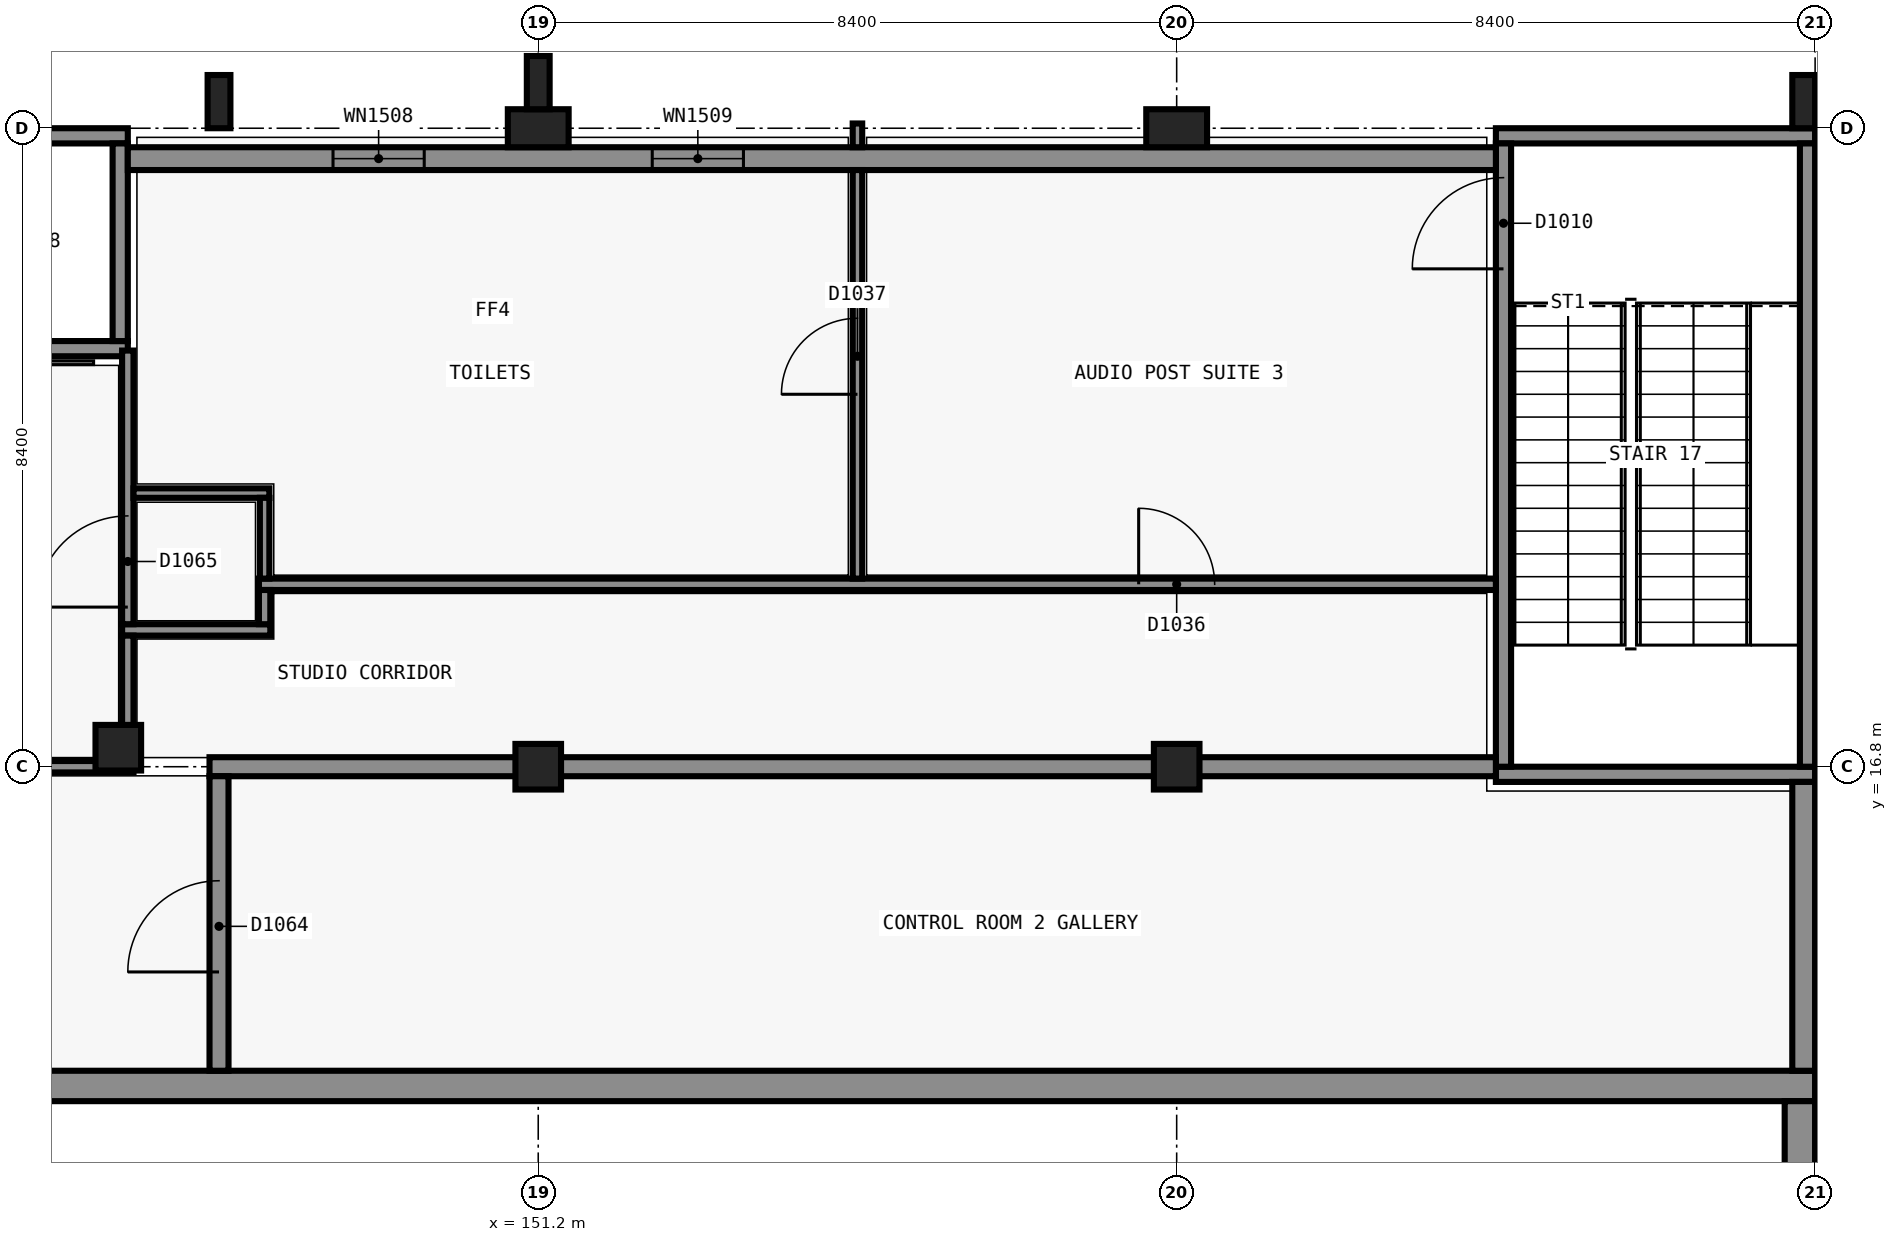
"""IFC4 building model, lengths in metres.
Left out: names, types, materials, properties, quantities, classifications, styles, units other than length and angle.
Written with IfcOpenShell. Run it as: python <this file> out.ifc"""

import sys

from ifc_helpers import new_model, si_unit, direction, frame, frame_2d, origin, origin_2d, place, context, subcontext, project, spatial, rectangle, extrude, element, fill, save


model = new_model("IFC4")
c1 = context("Model", 3, precision=1e-05, world=origin(), true_north=direction((0.0, 1.0)))
c2 = subcontext(c1, "Body", "Model", "MODEL_VIEW")
j1 = project(units=[si_unit("LENGTHUNIT", "METRE"), si_unit("PLANEANGLEUNIT", "RADIAN")], contexts=[c1])
p1 = place(None, origin())
s1 = spatial("IfcSite", under=j1, at=p1, CompositionType="ELEMENT")
p2 = place(p1, origin())
s2 = spatial("IfcBuilding", under=s1, at=p2, CompositionType="ELEMENT")
p3 = place(p2, frame((0.0, 0.0, 5.4)))
s3 = spatial("IfcBuildingStorey", under=s2, at=p3, CompositionType="ELEMENT", Elevation=5.4)
for number, where, z_axis, x_axis in (
    (1, (168.0, 16.7, 0.0), (0.0, 0.0, 1.0), (-1.0, 0.0, 0.0)),
    (2, (163.8, 25.1, 0.0), (0.0, 0.0, 1.0), (1.0, 0.0, 0.0)),
):
    element("IfcWall", number, at=place(p3, frame(where, z_axis=z_axis, x_axis=x_axis)), inside=s3, PredefinedType="SHEAR", context=c2, shape_type="SweptSolid", body=[
        extrude(rectangle(XDim=4.199, YDim=0.2, at=frame_2d((2.1, 0.0))), origin(), (0.0, 0.0, 1.0), 4.8),
    ])
p4 = place(p3, frame((163.9, 16.8, 0.0), z_axis=(0.0, 0.0, 1.0), x_axis=(0.0, 1.0, 0.0)))
e3 = element("IfcWall", 3, at=p4, inside=s3, PredefinedType="SHEAR", context=c2, shape_type="SweptSolid", body=[
    extrude(rectangle(XDim=8.2, YDim=0.2, at=frame_2d((4.1, 0.0))), origin(), (0.0, 0.0, 1.0), 4.8),
])
p5 = place(p4, frame((6.55, 0.0, 0.0)))
e4 = element("IfcOpeningElement", 4, at=p5, cuts=e3, PredefinedType="OPENING", context=c2, shape_type="SweptSolid", body=[
    extrude(rectangle(XDim=1.2, YDim=2.1, at=frame_2d((0.6, 1.05))), frame((0.0, 0.11, 0.0), z_axis=(0.0, -1.0, 0.0), x_axis=(1.0, 0.0, 0.0)), (0.0, 0.0, 1.0), 0.22),
])
p6 = place(p3, frame((167.9, 25.0, 0.0), z_axis=(0.0, 0.0, 1.0), x_axis=(0.0, -1.0, 0.0)))
e5 = element("IfcWall", 5, at=p6, inside=s3, PredefinedType="SHEAR", context=c2, shape_type="SweptSolid", body=[
    extrude(rectangle(XDim=8.2, YDim=0.2, at=frame_2d((4.1, 0.0))), origin(), (0.0, 0.0, 1.0), 4.8),
])
p7 = place(p3, frame((145.8, 22.3, 0.0), z_axis=(0.0, 0.0, 1.0), x_axis=(-1.0, 0.0, 0.0)))
e6 = element("IfcWall", 6, at=p7, inside=s3, PredefinedType="SHEAR", context=c2, shape_type="SweptSolid", body=[
    extrude(rectangle(XDim=4.2, YDim=0.2, at=frame_2d((2.1, 0.0))), origin(), (0.0, 0.0, 1.0), 4.8),
])
p8 = place(p7, frame((1.55, 0.0, 0.0)))
e7 = element("IfcOpeningElement", 7, at=p8, cuts=e6, PredefinedType="OPENING", context=c2, shape_type="SweptSolid", body=[
    extrude(rectangle(XDim=1.1, YDim=2.1, at=frame_2d((0.55, 1.05))), frame((0.0, 0.11, 0.0), z_axis=(0.0, -1.0, 0.0), x_axis=(1.0, 0.0, 0.0)), (0.0, 0.0, 1.0), 0.22),
])
p9 = place(p3, frame((141.6, 25.1, 0.0), z_axis=(0.0, 0.0, 1.0), x_axis=(1.0, 0.0, 0.0)))
e8 = element("IfcWall", 8, at=p9, inside=s3, PredefinedType="SHEAR", context=c2, shape_type="SweptSolid", body=[
    extrude(rectangle(XDim=4.2, YDim=0.2, at=frame_2d((2.1, 0.0))), origin(), (0.0, 0.0, 1.0), 4.8),
])
p10 = place(p3, frame((145.7, 25.0, 0.0), z_axis=(0.0, 0.0, 1.0), x_axis=(0.0, -1.0, 0.0)))
e9 = element("IfcWall", 9, at=p10, inside=s3, PredefinedType="SHEAR", context=c2, shape_type="SweptSolid", body=[
    extrude(rectangle(XDim=2.6, YDim=0.2, at=frame_2d((1.3, 0.0))), origin(), (0.0, 0.0, 1.0), 4.8),
])
p11 = place(p3, frame((143.0, 12.6, 0.0), z_axis=(0.0, 0.0, 1.0), x_axis=(1.0, 0.0, 0.0)))
e10 = element("IfcWall", 10, at=p11, inside=s3, PredefinedType="SHEAR", context=c2, shape_type="SweptSolid", body=[
    extrude(rectangle(XDim=25.0, YDim=0.4, at=frame_2d((12.5, 0.0))), origin(), (0.0, 0.0, 1.0), 4.8),
])
p12 = place(p3, frame((167.8, 12.4, 0.0), z_axis=(0.0, 0.0, 1.0), x_axis=(0.0, -1.0, 0.0)))
e11 = element("IfcWall", 11, at=p12, inside=s3, PredefinedType="SHEAR", context=c2, shape_type="SweptSolid", body=[
    extrude(rectangle(XDim=12.0, YDim=0.4, at=frame_2d((6.0, 0.0))), origin(), (0.0, 0.0, 1.0), 4.8),
])
p13 = place(p3, frame((167.85, 16.6, 0.0), z_axis=(0.0, 0.0, 1.0), x_axis=(0.0, -1.0, 0.0)))
e12 = element("IfcWall", 12, at=p13, inside=s3, PredefinedType="SOLIDWALL", context=c2, shape_type="SweptSolid", body=[
    extrude(rectangle(XDim=3.8, YDim=0.3, at=frame_2d((1.9, 0.0))), origin(), (0.0, 0.0, 1.0), 4.8),
])
p14 = place(p3, frame((151.2, 16.8, 0.0), z_axis=(0.0, 0.0, 1.0), x_axis=(1.0, 0.0, 0.0)))
e13 = element("IfcColumn", 13, at=p14, inside=s3, PredefinedType="COLUMN", context=c2, shape_type="SweptSolid", body=[
    extrude(rectangle(XDim=0.6, YDim=0.6, at=origin_2d()), origin(), (0.0, 0.0, 1.0), 4.8),
])
p15 = place(p3, frame((151.2, 25.2, 0.0), z_axis=(0.0, 0.0, 1.0), x_axis=(1.0, 0.0, 0.0)))
e14 = element("IfcColumn", 14, at=p15, inside=s3, PredefinedType="COLUMN", context=c2, shape_type="SweptSolid", body=[
    extrude(rectangle(XDim=0.8, YDim=0.5, at=origin_2d()), origin(), (0.0, 0.0, 1.0), 4.8),
])
p16 = place(p3, frame((159.6, 16.8, 0.0), z_axis=(0.0, 0.0, 1.0), x_axis=(1.0, 0.0, 0.0)))
e15 = element("IfcColumn", 15, at=p16, inside=s3, PredefinedType="COLUMN", context=c2, shape_type="SweptSolid", body=[
    extrude(rectangle(XDim=0.6, YDim=0.6, at=origin_2d()), origin(), (0.0, 0.0, 1.0), 4.8),
])
p17 = place(p3, frame((159.6, 25.2, 0.0), z_axis=(0.0, 0.0, 1.0), x_axis=(1.0, 0.0, 0.0)))
e16 = element("IfcColumn", 16, at=p17, inside=s3, PredefinedType="COLUMN", context=c2, shape_type="SweptSolid", body=[
    extrude(rectangle(XDim=0.8, YDim=0.5, at=origin_2d()), origin(), (0.0, 0.0, 1.0), 4.8),
])
p18 = place(p3, frame((145.675, 17.05, 0.0), z_axis=(0.0, 0.0, 1.0), x_axis=(1.0, 0.0, 0.0)))
e17 = element("IfcColumn", 17, at=p18, inside=s3, PredefinedType="COLUMN", context=c2, shape_type="SweptSolid", body=[
    extrude(rectangle(XDim=0.6, YDim=0.6, at=origin_2d()), origin(), (0.0, 0.0, 1.0), 4.8),
])
p19 = place(p3, frame((145.8, 24.8, 0.0), z_axis=(0.0, 0.0, 1.0), x_axis=(1.0, 0.0, 0.0)))
e18 = element("IfcWall", 18, at=p19, inside=s3, PredefinedType="SOLIDWALL", context=c2, shape_type="SweptSolid", body=[
    extrude(rectangle(XDim=18.0, YDim=0.3, at=frame_2d((9.0, 0.0))), origin(), (0.0, 0.0, 1.0), 4.5),
])
p20 = place(p19, frame((2.7, 0.0, 1.5)))
e19 = element("IfcOpeningElement", 19, at=p20, cuts=e18, PredefinedType="OPENING", context=c2, shape_type="SweptSolid", body=[
    extrude(rectangle(XDim=1.2, YDim=0.9, at=frame_2d((0.6, 0.45))), frame((0.0, 0.16, 0.0), z_axis=(0.0, -1.0, 0.0), x_axis=(1.0, 0.0, 0.0)), (0.0, 0.0, 1.0), 0.32),
])
p21 = place(p19, frame((6.9, 0.0, 1.5)))
e20 = element("IfcOpeningElement", 20, at=p21, cuts=e18, PredefinedType="OPENING", context=c2, shape_type="SweptSolid", body=[
    extrude(rectangle(XDim=1.2, YDim=0.9, at=frame_2d((0.6, 0.45))), frame((0.0, 0.16, 0.0), z_axis=(0.0, -1.0, 0.0), x_axis=(1.0, 0.0, 0.0)), (0.0, 0.0, 1.0), 0.32),
])
for number, where, z_axis, x_axis in (
    (21, (147.0, 25.55, 0.0), (0.0, 0.0, 1.0), (1.0, 0.0, 0.0)),
    (22, (151.2, 25.8, 0.0), (0.0, 0.0, 1.0), (1.0, 0.0, 0.0)),
    (23, (167.85, 25.55, 0.0), (0.0, 0.0, 1.0), (1.0, 0.0, 0.0)),
):
    element("IfcColumn", number, at=place(p3, frame(where, z_axis=z_axis, x_axis=x_axis)), inside=s3, PredefinedType="PILASTER", context=c2, shape_type="SweptSolid", body=[
        extrude(rectangle(XDim=0.3, YDim=0.7, at=origin_2d()), origin(), (0.0, 0.0, 1.0), 4.8),
    ])
p22 = place(p3, frame((146.875, 16.8, 0.0), z_axis=(0.0, 0.0, 1.0), x_axis=(1.0, 0.0, 0.0)))
e24 = element("IfcWall", 24, at=p22, inside=s3, PredefinedType="PARTITIONING", context=c2, shape_type="SweptSolid", body=[
    extrude(rectangle(XDim=16.925, YDim=0.25, at=frame_2d((8.462, 0.0))), origin(), (0.0, 0.0, 1.0), 3.8),
])
p23 = place(p3, frame((147.0, 12.8, 0.0), z_axis=(0.0, 0.0, 1.0), x_axis=(0.0, 1.0, 0.0)))
e25 = element("IfcWall", 25, at=p23, inside=s3, PredefinedType="PARTITIONING", context=c2, shape_type="SweptSolid", body=[
    extrude(rectangle(XDim=3.875, YDim=0.25, at=frame_2d((1.938, 0.0))), origin(), (0.0, 0.0, 1.0), 3.8),
])
p24 = place(p23, frame((1.3, 0.0, 0.0)))
e26 = element("IfcOpeningElement", 26, at=p24, cuts=e25, PredefinedType="OPENING", context=c2, shape_type="SweptSolid", body=[
    extrude(rectangle(XDim=1.2, YDim=2.1, at=frame_2d((0.6, 1.05))), frame((0.0, 0.135, 0.0), z_axis=(0.0, -1.0, 0.0), x_axis=(1.0, 0.0, 0.0)), (0.0, 0.0, 1.0), 0.27),
])
p25 = place(p3, frame((145.725, 18.6, 0.0), z_axis=(0.0, 0.0, 1.0), x_axis=(1.0, 0.0, 0.0)))
e27 = element("IfcWall", 27, at=p25, inside=s3, PredefinedType="PARTITIONING", context=c2, shape_type="SweptSolid", body=[
    extrude(rectangle(XDim=1.95, YDim=0.15, at=frame_2d((0.975, 0.0))), origin(), (0.0, 0.0, 1.0), 4.5),
])
p26 = place(p3, frame((147.525, 19.2, 0.0), z_axis=(0.0, 0.0, 1.0), x_axis=(1.0, 0.0, 0.0)))
e28 = element("IfcWall", 28, at=p26, inside=s3, PredefinedType="PARTITIONING", context=c2, shape_type="SweptSolid", body=[
    extrude(rectangle(XDim=16.275, YDim=0.15, at=frame_2d((8.137, 0.0))), origin(), (0.0, 0.0, 1.0), 3.8),
])
p27 = place(p26, frame((11.575, 0.0, 0.0)))
e29 = element("IfcOpeningElement", 29, at=p27, cuts=e28, PredefinedType="OPENING", context=c2, shape_type="SweptSolid", body=[
    extrude(rectangle(XDim=1.0, YDim=2.1, at=frame_2d((0.5, 1.05))), frame((0.0, 0.085, 0.0), z_axis=(0.0, -1.0, 0.0), x_axis=(1.0, 0.0, 0.0)), (0.0, 0.0, 1.0), 0.17),
])
p28 = place(p3, frame((138.525, 16.8, 0.0), z_axis=(0.0, 0.0, 1.0), x_axis=(1.0, 0.0, 0.0)))
e30 = element("IfcWall", 30, at=p28, inside=s3, PredefinedType="SOLIDWALL", context=c2, shape_type="SweptSolid", body=[
    extrude(rectangle(XDim=7.35, YDim=0.15, at=frame_2d((3.675, 0.0))), origin(), (0.0, 0.0, 1.0), 3.8),
])
p29 = place(p3, frame((147.6, 18.675, 0.0), z_axis=(0.0, 0.0, 1.0), x_axis=(0.0, 1.0, 0.0)))
e31 = element("IfcWall", 31, at=p29, inside=s3, PredefinedType="PARTITIONING", context=c2, shape_type="SweptSolid", body=[
    extrude(rectangle(XDim=0.45, YDim=0.15, at=frame_2d((0.225, 0.0))), origin(), (0.0, 0.0, 1.0), 4.5),
])
p30 = place(p3, frame((145.8, 16.875, 0.0), z_axis=(0.0, 0.0, 1.0), x_axis=(0.0, 1.0, 0.0)))
e32 = element("IfcWall", 32, at=p30, inside=s3, PredefinedType="SOLIDWALL", context=c2, shape_type="SweptSolid", body=[
    extrude(rectangle(XDim=1.65, YDim=0.15, at=frame_2d((0.825, 0.0))), origin(), (0.0, 0.0, 1.0), 3.8),
])
p31 = place(p3, frame((145.8, 18.675, 0.0), z_axis=(0.0, 0.0, 1.0), x_axis=(0.0, 1.0, 0.0)))
e33 = element("IfcWall", 33, at=p31, inside=s3, PredefinedType="SOLIDWALL", context=c2, shape_type="SweptSolid", body=[
    extrude(rectangle(XDim=3.6, YDim=0.15, at=frame_2d((1.8, 0.0))), origin(), (0.0, 0.0, 1.0), 4.5),
])
p32 = place(p31, frame((0.225, 0.0, 0.0)))
e34 = element("IfcOpeningElement", 34, at=p32, cuts=e33, PredefinedType="OPENING", context=c2, shape_type="SweptSolid", body=[
    extrude(rectangle(XDim=1.2, YDim=2.1, at=frame_2d((0.6, 1.05))), frame((0.0, 0.085, 0.0), z_axis=(0.0, -1.0, 0.0), x_axis=(1.0, 0.0, 0.0)), (0.0, 0.0, 1.0), 0.17),
])
p33 = place(p3, frame((145.875, 20.4, 0.0), z_axis=(0.0, 0.0, 1.0), x_axis=(1.0, 0.0, 0.0)))
e35 = element("IfcWall", 35, at=p33, inside=s3, PredefinedType="PARTITIONING", context=c2, shape_type="SweptSolid", body=[
    extrude(rectangle(XDim=1.788, YDim=0.125, at=frame_2d((0.894, 0.0))), origin(), (0.0, 0.0, 1.0), 4.5),
])
p34 = place(p3, frame((147.6, 19.275, 0.0), z_axis=(0.0, 0.0, 1.0), x_axis=(0.0, 1.0, 0.0)))
e36 = element("IfcWall", 36, at=p34, inside=s3, PredefinedType="PARTITIONING", context=c2, shape_type="SweptSolid", body=[
    extrude(rectangle(XDim=1.062, YDim=0.125, at=frame_2d((0.531, 0.0))), origin(), (0.0, 0.0, 1.0), 4.5),
])
p35 = place(p3, frame((155.4, 19.275, 0.0), z_axis=(0.0, 0.0, 1.0), x_axis=(0.0, 1.0, 0.0)))
e37 = element("IfcWall", 37, at=p35, inside=s3, PredefinedType="PARTITIONING", context=c2, shape_type="SweptSolid", body=[
    extrude(rectangle(XDim=5.375, YDim=0.125, at=frame_2d((2.688, 0.0))), origin(), (0.0, 0.0, 1.0), 4.5),
])
p36 = place(p35, frame((2.425, 0.0, 0.0)))
e38 = element("IfcOpeningElement", 38, at=p36, cuts=e37, PredefinedType="OPENING", context=c2, shape_type="SweptSolid", body=[
    extrude(rectangle(XDim=1.0, YDim=2.1, at=frame_2d((0.5, 1.05))), frame((0.0, 0.073, 0.0), z_axis=(0.0, -1.0, 0.0), x_axis=(1.0, 0.0, 0.0)), (0.0, 0.0, 1.0), 0.145),
])
p37 = place(p3, frame((155.4, 24.95, 0.0), z_axis=(0.0, 0.0, 1.0), x_axis=(0.0, 1.0, 0.0)))
e39 = element("IfcWall", 39, at=p37, inside=s3, PredefinedType="PARTITIONING", context=c2, shape_type="SweptSolid", body=[
    extrude(rectangle(XDim=0.312, YDim=0.125, at=frame_2d((0.156, 0.0))), origin(), (0.0, 0.0, 1.0), 3.8),
])
p38 = place(p20, origin())
e40 = element("IfcWindow", 40, at=p38, inside=s3, PartitioningType="SINGLE_PANEL", PredefinedType="WINDOW", context=c2, shape_type="SweptSolid", body=[
    extrude(rectangle(XDim=1.2, YDim=0.9, at=frame_2d((0.6, 0.45))), frame((0.0, 0.03, 0.0), z_axis=(0.0, -1.0, 0.0), x_axis=(1.0, 0.0, 0.0)), (0.0, 0.0, 1.0), 0.06),
])
fill(e19, e40)
p39 = place(p21, origin())
e41 = element("IfcWindow", 41, at=p39, inside=s3, PartitioningType="SINGLE_PANEL", PredefinedType="WINDOW", context=c2, shape_type="SweptSolid", body=[
    extrude(rectangle(XDim=1.2, YDim=0.9, at=frame_2d((0.6, 0.45))), frame((0.0, 0.03, 0.0), z_axis=(0.0, -1.0, 0.0), x_axis=(1.0, 0.0, 0.0)), (0.0, 0.0, 1.0), 0.06),
])
fill(e20, e41)
p40 = place(p5, origin())
e42 = element("IfcDoor", 42, at=p40, inside=s3, OperationType="SINGLE_SWING_RIGHT", PredefinedType="DOOR", context=c2, shape_type="SweptSolid", body=[
    extrude(rectangle(XDim=1.2, YDim=2.1, at=frame_2d((0.6, 1.05))), frame((0.0, 0.025, 0.0), z_axis=(0.0, -1.0, 0.0), x_axis=(1.0, 0.0, 0.0)), (0.0, 0.0, 1.0), 0.05),
])
fill(e4, e42)
p41 = place(p27, origin())
e43 = element("IfcDoor", 43, at=p41, inside=s3, OperationType="SINGLE_SWING_RIGHT", PredefinedType="DOOR", context=c2, shape_type="SweptSolid", body=[
    extrude(rectangle(XDim=1.0, YDim=2.1, at=frame_2d((0.5, 1.05))), frame((0.0, 0.025, 0.0), z_axis=(0.0, -1.0, 0.0), x_axis=(1.0, 0.0, 0.0)), (0.0, 0.0, 1.0), 0.05),
])
fill(e29, e43)
p42 = place(p36, origin())
e44 = element("IfcDoor", 44, at=p42, inside=s3, OperationType="SINGLE_SWING_RIGHT", PredefinedType="DOOR", context=c2, shape_type="SweptSolid", body=[
    extrude(rectangle(XDim=1.0, YDim=2.1, at=frame_2d((0.5, 1.05))), frame((0.0, 0.025, 0.0), z_axis=(0.0, -1.0, 0.0), x_axis=(1.0, 0.0, 0.0)), (0.0, 0.0, 1.0), 0.05),
])
fill(e38, e44)
p43 = place(p24, origin())
e45 = element("IfcDoor", 45, at=p43, inside=s3, OperationType="SINGLE_SWING_LEFT", PredefinedType="DOOR", context=c2, shape_type="SweptSolid", body=[
    extrude(rectangle(XDim=1.2, YDim=2.1, at=frame_2d((0.6, 1.05))), frame((0.0, 0.025, 0.0), z_axis=(0.0, -1.0, 0.0), x_axis=(1.0, 0.0, 0.0)), (0.0, 0.0, 1.0), 0.05),
])
fill(e26, e45)
p44 = place(p32, origin())
e46 = element("IfcDoor", 46, at=p44, inside=s3, OperationType="SINGLE_SWING_RIGHT", PredefinedType="DOOR", context=c2, shape_type="SweptSolid", body=[
    extrude(rectangle(XDim=1.2, YDim=2.1, at=frame_2d((0.6, 1.05))), frame((0.0, 0.025, 0.0), z_axis=(0.0, -1.0, 0.0), x_axis=(1.0, 0.0, 0.0)), (0.0, 0.0, 1.0), 0.05),
])
fill(e34, e46)
save(model, sys.argv[1])
